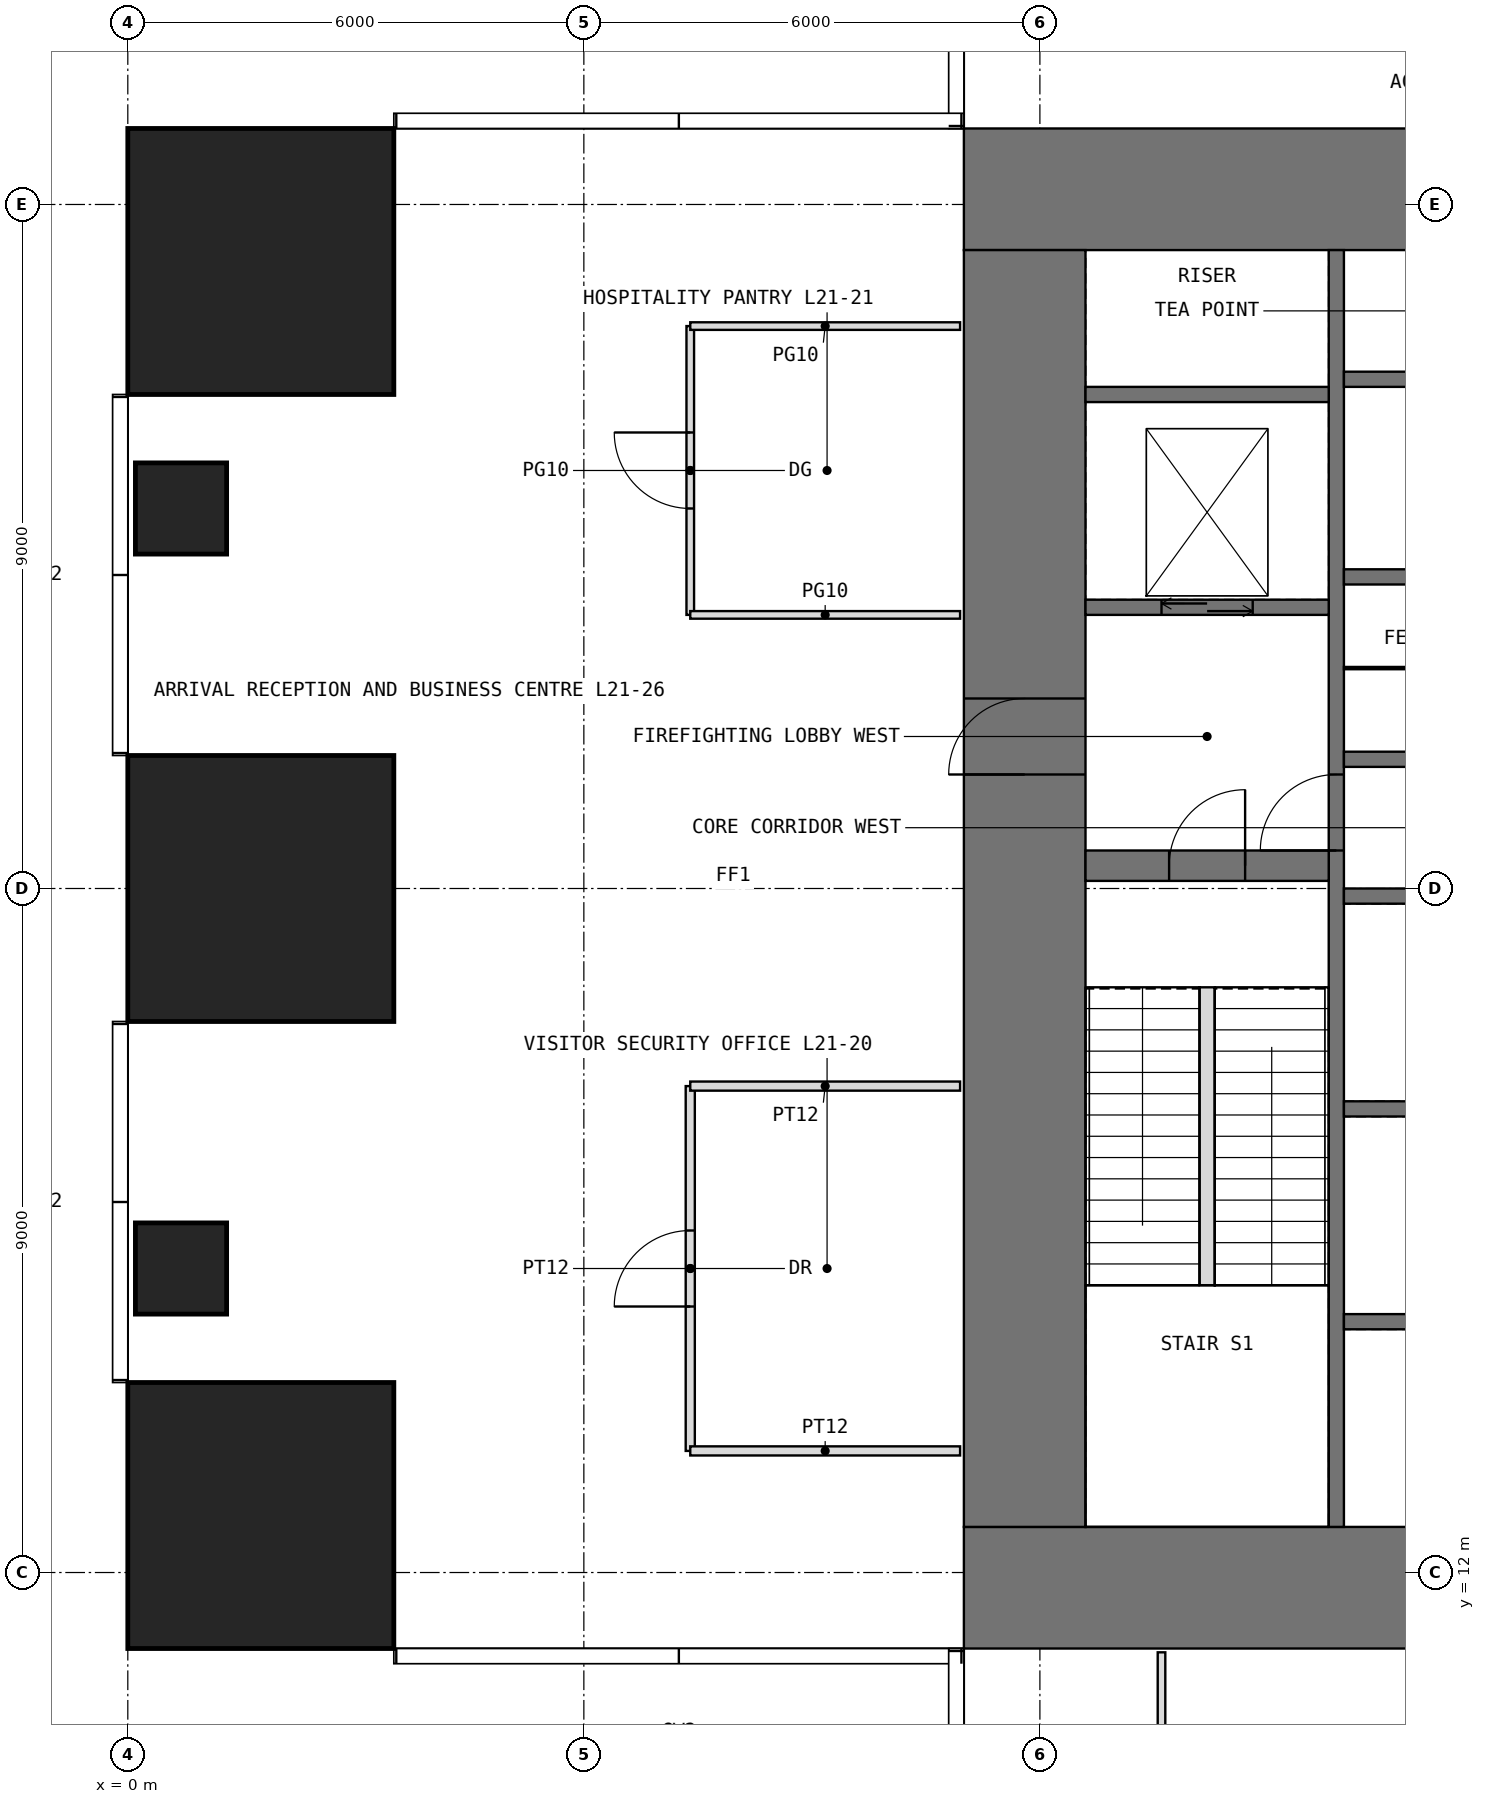
"""IFC4 building model, lengths in metres.
Left out: names, types, materials, properties, quantities, classifications, styles, units other than length and angle.
Written with IfcOpenShell. Run it as: python <this file> out.ifc"""

import sys

from ifc_helpers import new_model, si_unit, direction, frame, frame_2d, origin, origin_2d, place, context, subcontext, project, spatial, rectangle, extrude, element, fill, save


model = new_model("IFC4")
c1 = context("Model", 3, precision=1e-05, world=origin(), true_north=direction((0.0, 1.0)))
c2 = subcontext(c1, "Body", "Model", "MODEL_VIEW")
j1 = project(units=[si_unit("LENGTHUNIT", "METRE"), si_unit("PLANEANGLEUNIT", "RADIAN")], contexts=[c1])
p1 = place(None, origin())
s1 = spatial("IfcSite", under=j1, at=p1, CompositionType="ELEMENT")
p2 = place(p1, origin())
s2 = spatial("IfcBuilding", under=s1, at=p2, CompositionType="ELEMENT")
p3 = place(p2, frame((0.0, 0.0, 91.5)))
s3 = spatial("IfcBuildingStorey", under=s2, at=p3, CompositionType="ELEMENT", Elevation=91.5)
p4 = place(p3, frame((1.75, 12.75, 0.0), z_axis=(0.0, 0.0, 1.0), x_axis=(1.0, 0.0, 0.0)))
e1 = element("IfcColumn", 1, at=p4, inside=s3, PredefinedType="COLUMN", context=c2, shape_type="SweptSolid", body=[
    extrude(rectangle(XDim=3.5, YDim=3.5, at=origin_2d()), origin(), (0.0, 0.0, 1.0), 5.0),
])
p5 = place(p3, frame((0.7, 16.0, 0.0), z_axis=(0.0, 0.0, 1.0), x_axis=(1.0, 0.0, 0.0)))
e2 = element("IfcColumn", 2, at=p5, inside=s3, PredefinedType="COLUMN", context=c2, shape_type="SweptSolid", body=[
    extrude(rectangle(XDim=1.2, YDim=1.2, at=origin_2d()), origin(), (0.0, 0.0, 1.0), 5.0),
])
p6 = place(p3, frame((1.75, 21.0, 0.0), z_axis=(0.0, 0.0, 1.0), x_axis=(1.0, 0.0, 0.0)))
e3 = element("IfcColumn", 3, at=p6, inside=s3, PredefinedType="COLUMN", context=c2, shape_type="SweptSolid", body=[
    extrude(rectangle(XDim=3.5, YDim=3.5, at=origin_2d()), origin(), (0.0, 0.0, 1.0), 5.0),
])
p7 = place(p3, frame((0.7, 26.0, 0.0), z_axis=(0.0, 0.0, 1.0), x_axis=(1.0, 0.0, 0.0)))
e4 = element("IfcColumn", 4, at=p7, inside=s3, PredefinedType="COLUMN", context=c2, shape_type="SweptSolid", body=[
    extrude(rectangle(XDim=1.2, YDim=1.2, at=origin_2d()), origin(), (0.0, 0.0, 1.0), 5.0),
])
p8 = place(p3, frame((1.75, 29.25, 0.0), z_axis=(0.0, 0.0, 1.0), x_axis=(1.0, 0.0, 0.0)))
e5 = element("IfcColumn", 5, at=p8, inside=s3, PredefinedType="COLUMN", context=c2, shape_type="SweptSolid", body=[
    extrude(rectangle(XDim=3.5, YDim=3.5, at=origin_2d()), origin(), (0.0, 0.0, 1.0), 5.0),
])
p9 = place(p3, frame((11.0, 11.8, -0.05), z_axis=(0.0, 0.0, 1.0), x_axis=(1.0, 0.0, 0.0)))
e6 = element("IfcWall", 6, at=p9, inside=s3, PredefinedType="SHEAR", context=c2, shape_type="SweptSolid", body=[
    extrude(rectangle(XDim=20.0, YDim=1.6, at=frame_2d((10.0, 0.0))), origin(), (0.0, 0.0, 1.0), 5.0),
])
p10 = place(p9, frame((9.0, 0.0, 0.05)))
e7 = element("IfcOpeningElement", 7, at=p10, cuts=e6, PredefinedType="OPENING", context=c2, shape_type="SweptSolid", body=[
    extrude(rectangle(XDim=2.0, YDim=2.2, at=frame_2d((1.0, 1.1))), frame((0.0, 0.81, 0.0), z_axis=(0.0, -1.0, 0.0), x_axis=(1.0, 0.0, 0.0)), (0.0, 0.0, 1.0), 1.62),
])
p11 = place(p3, frame((11.0, 30.2, -0.05), z_axis=(0.0, 0.0, 1.0), x_axis=(1.0, 0.0, 0.0)))
e8 = element("IfcWall", 8, at=p11, inside=s3, PredefinedType="SHEAR", context=c2, shape_type="SweptSolid", body=[
    extrude(rectangle(XDim=20.0, YDim=1.6, at=frame_2d((10.0, 0.0))), origin(), (0.0, 0.0, 1.0), 5.0),
])
p12 = place(p11, frame((9.0, 0.0, 0.05)))
e9 = element("IfcOpeningElement", 9, at=p12, cuts=e8, PredefinedType="OPENING", context=c2, shape_type="SweptSolid", body=[
    extrude(rectangle(XDim=2.0, YDim=2.2, at=frame_2d((1.0, 1.1))), frame((0.0, 0.81, 0.0), z_axis=(0.0, -1.0, 0.0), x_axis=(1.0, 0.0, 0.0)), (0.0, 0.0, 1.0), 1.62),
])
p13 = place(p3, frame((11.8, 12.6, -0.05), z_axis=(0.0, 0.0, 1.0), x_axis=(0.0, 1.0, 0.0)))
e10 = element("IfcWall", 10, at=p13, inside=s3, PredefinedType="SHEAR", context=c2, shape_type="SweptSolid", body=[
    extrude(rectangle(XDim=16.8, YDim=1.6, at=frame_2d((8.4, 0.0))), origin(), (0.0, 0.0, 1.0), 5.0),
])
p14 = place(p13, frame((9.9, 0.0, 0.05)))
e11 = element("IfcOpeningElement", 11, at=p14, cuts=e10, PredefinedType="OPENING", context=c2, shape_type="SweptSolid", body=[
    extrude(rectangle(XDim=1.0, YDim=2.2, at=frame_2d((0.5, 1.1))), frame((0.0, 0.81, 0.0), z_axis=(0.0, -1.0, 0.0), x_axis=(1.0, 0.0, 0.0)), (0.0, 0.0, 1.0), 1.62),
])
p15 = place(p3, frame((15.9, 12.6, -0.05), z_axis=(0.0, 0.0, 1.0), x_axis=(0.0, 1.0, 0.0)))
e12 = element("IfcWall", 12, at=p15, inside=s3, PredefinedType="SHEAR", context=c2, shape_type="SweptSolid", body=[
    extrude(rectangle(XDim=16.8, YDim=0.2, at=frame_2d((8.4, 0.0))), origin(), (0.0, 0.0, 1.0), 5.0),
])
p16 = place(p15, frame((8.9, 0.0, 0.05)))
e13 = element("IfcOpeningElement", 13, at=p16, cuts=e12, PredefinedType="OPENING", context=c2, shape_type="SweptSolid", body=[
    extrude(rectangle(XDim=1.0, YDim=2.2, at=frame_2d((0.5, 1.1))), frame((0.0, 0.11, 0.0), z_axis=(0.0, -1.0, 0.0), x_axis=(1.0, 0.0, 0.0)), (0.0, 0.0, 1.0), 0.22),
])
p17 = place(p3, frame((12.6, 21.3, -0.05), z_axis=(0.0, 0.0, 1.0), x_axis=(1.0, 0.0, 0.0)))
e14 = element("IfcWall", 14, at=p17, inside=s3, PredefinedType="SHEAR", context=c2, shape_type="SweptSolid", body=[
    extrude(rectangle(XDim=3.2, YDim=0.4, at=frame_2d((1.6, 0.0))), origin(), (0.0, 0.0, 1.0), 5.0),
])
p18 = place(p17, frame((1.1, 0.0, 0.05)))
e15 = element("IfcOpeningElement", 15, at=p18, cuts=e14, PredefinedType="OPENING", context=c2, shape_type="SweptSolid", body=[
    extrude(rectangle(XDim=1.0, YDim=2.2, at=frame_2d((0.5, 1.1))), frame((0.0, 0.21, 0.0), z_axis=(0.0, -1.0, 0.0), x_axis=(1.0, 0.0, 0.0)), (0.0, 0.0, 1.0), 0.42),
])
p19 = place(p3, frame((12.6, 24.7, -0.05), z_axis=(0.0, 0.0, 1.0), x_axis=(1.0, 0.0, 0.0)))
e16 = element("IfcWall", 16, at=p19, inside=s3, PredefinedType="SHEAR", context=c2, shape_type="SweptSolid", body=[
    extrude(rectangle(XDim=3.2, YDim=0.2, at=frame_2d((1.6, 0.0))), origin(), (0.0, 0.0, 1.0), 5.0),
])
p20 = place(p19, frame((1.0, 0.0, 0.05)))
e17 = element("IfcOpeningElement", 17, at=p20, cuts=e16, PredefinedType="OPENING", context=c2, shape_type="SweptSolid", body=[
    extrude(rectangle(XDim=1.2, YDim=2.2, at=frame_2d((0.6, 1.1))), frame((0.0, 0.11, 0.0), z_axis=(0.0, -1.0, 0.0), x_axis=(1.0, 0.0, 0.0)), (0.0, 0.0, 1.0), 0.22),
])
for number, where, z_axis, x_axis in (
    (18, (12.6, 27.5, -0.05), (0.0, 0.0, 1.0), (1.0, 0.0, 0.0)),
    (19, (16.0, 15.3, -0.05), (0.0, 0.0, 1.0), (1.0, 0.0, 0.0)),
    (20, (16.0, 18.1, -0.05), (0.0, 0.0, 1.0), (1.0, 0.0, 0.0)),
    (21, (16.0, 20.9, -0.05), (0.0, 0.0, 1.0), (1.0, 0.0, 0.0)),
    (22, (16.0, 22.7, -0.05), (0.0, 0.0, 1.0), (1.0, 0.0, 0.0)),
    (23, (16.0, 25.1, -0.05), (0.0, 0.0, 1.0), (1.0, 0.0, 0.0)),
    (24, (16.0, 27.7, -0.05), (0.0, 0.0, 1.0), (1.0, 0.0, 0.0)),
):
    element("IfcWall", number, at=place(p3, frame(where, z_axis=z_axis, x_axis=x_axis)), inside=s3, PredefinedType="SHEAR", context=c2, shape_type="SweptSolid", body=[
        extrude(rectangle(XDim=3.2, YDim=0.2, at=frame_2d((1.6, 0.0))), origin(), (0.0, 0.0, 1.0), 5.0),
    ])
p21 = place(p3, frame((16.0, 23.9, 0.0), z_axis=(0.0, 0.0, 1.0), x_axis=(1.0, 0.0, 0.0)))
e25 = element("IfcWall", 25, at=p21, inside=s3, PredefinedType="PARTITIONING", context=c2, shape_type="SweptSolid", body=[
    extrude(rectangle(XDim=1.4, YDim=0.03, at=frame_2d((0.7, 0.0))), origin(), (0.0, 0.0, 1.0), 4.75),
])
p22 = place(p3, frame((7.4, 13.6, 0.0), z_axis=(0.0, 0.0, 1.0), x_axis=(0.0, 1.0, 0.0)))
e26 = element("IfcWall", 26, at=p22, inside=s3, PredefinedType="PARTITIONING", context=c2, shape_type="SweptSolid", body=[
    extrude(rectangle(XDim=4.8, YDim=0.12, at=frame_2d((2.4, 0.0))), origin(), (0.0, 0.0, 1.0), 4.75),
])
p23 = place(p22, frame((1.9, 0.0, 0.0)))
e27 = element("IfcOpeningElement", 27, at=p23, cuts=e26, PredefinedType="OPENING", context=c2, shape_type="SweptSolid", body=[
    extrude(rectangle(XDim=1.0, YDim=2.2, at=frame_2d((0.5, 1.1))), frame((0.0, 0.07, 0.0), z_axis=(0.0, -1.0, 0.0), x_axis=(1.0, 0.0, 0.0)), (0.0, 0.0, 1.0), 0.14),
])
for number, where, z_axis, x_axis in (
    (28, (7.4, 13.6, 0.0), (0.0, 0.0, 1.0), (1.0, 0.0, 0.0)),
    (29, (7.4, 18.4, 0.0), (0.0, 0.0, 1.0), (1.0, 0.0, 0.0)),
):
    element("IfcWall", number, at=place(p3, frame(where, z_axis=z_axis, x_axis=x_axis)), inside=s3, PredefinedType="PARTITIONING", context=c2, shape_type="SweptSolid", body=[
        extrude(rectangle(XDim=3.55, YDim=0.12, at=frame_2d((1.775, 0.0))), origin(), (0.0, 0.0, 1.0), 4.75),
    ])
p24 = place(p3, frame((7.4, 24.6, 0.0), z_axis=(0.0, 0.0, 1.0), x_axis=(0.0, 1.0, 0.0)))
e30 = element("IfcWall", 30, at=p24, inside=s3, PredefinedType="PARTITIONING", context=c2, shape_type="SweptSolid", body=[
    extrude(rectangle(XDim=3.8, YDim=0.1, at=frame_2d((1.9, 0.0))), origin(), (0.0, 0.0, 1.0), 4.75),
])
p25 = place(p24, frame((1.4, 0.0, 0.0)))
e31 = element("IfcOpeningElement", 31, at=p25, cuts=e30, PredefinedType="OPENING", context=c2, shape_type="SweptSolid", body=[
    extrude(rectangle(XDim=1.0, YDim=2.4, at=frame_2d((0.5, 1.2))), frame((0.0, 0.06, 0.0), z_axis=(0.0, -1.0, 0.0), x_axis=(1.0, 0.0, 0.0)), (0.0, 0.0, 1.0), 0.12),
])
for number, where, z_axis, x_axis in (
    (32, (7.4, 24.6, 0.0), (0.0, 0.0, 1.0), (1.0, 0.0, 0.0)),
    (33, (7.4, 28.4, 0.0), (0.0, 0.0, 1.0), (1.0, 0.0, 0.0)),
):
    element("IfcWall", number, at=place(p3, frame(where, z_axis=z_axis, x_axis=x_axis)), inside=s3, PredefinedType="PARTITIONING", context=c2, shape_type="SweptSolid", body=[
        extrude(rectangle(XDim=3.55, YDim=0.1, at=frame_2d((1.775, 0.0))), origin(), (0.0, 0.0, 1.0), 4.75),
    ])
p26 = place(p3, frame((13.6, 7.0, 0.0), z_axis=(0.0, 0.0, 1.0), x_axis=(0.0, 1.0, 0.0)))
e34 = element("IfcWall", 34, at=p26, inside=s3, PredefinedType="PARTITIONING", context=c2, shape_type="SweptSolid", body=[
    extrude(rectangle(XDim=3.95, YDim=0.1, at=frame_2d((1.975, 0.0))), origin(), (0.0, 0.0, 1.0), 4.75),
])
p27 = place(p3, frame((14.2, 15.78, 0.0), z_axis=(0.0, 0.0, 1.0), x_axis=(0.0, 1.0, 0.0)))
e35 = element("IfcWall", 35, at=p27, inside=s3, PredefinedType="PARTITIONING", context=c2, shape_type="SweptSolid", body=[
    extrude(rectangle(XDim=3.92, YDim=0.2, at=frame_2d((1.96, 0.0))), origin(), (0.0, 0.0, 1.0), 5.0),
])
p28 = place(p14, origin())
e36 = element("IfcDoor", 36, at=p28, inside=s3, OperationType="SINGLE_SWING_LEFT", PredefinedType="DOOR", context=c2, shape_type="SweptSolid", body=[
    extrude(rectangle(XDim=1.0, YDim=2.2, at=frame_2d((0.5, 1.1))), frame((0.0, 0.025, 0.0), z_axis=(0.0, -1.0, 0.0), x_axis=(1.0, 0.0, 0.0)), (0.0, 0.0, 1.0), 0.05),
])
fill(e11, e36)
p29 = place(p18, origin())
e37 = element("IfcDoor", 37, at=p29, inside=s3, OperationType="SINGLE_SWING_RIGHT", PredefinedType="DOOR", context=c2, shape_type="SweptSolid", body=[
    extrude(rectangle(XDim=1.0, YDim=2.2, at=frame_2d((0.5, 1.1))), frame((0.0, 0.025, 0.0), z_axis=(0.0, -1.0, 0.0), x_axis=(1.0, 0.0, 0.0)), (0.0, 0.0, 1.0), 0.05),
])
fill(e15, e37)
p30 = place(p16, origin())
e38 = element("IfcDoor", 38, at=p30, inside=s3, OperationType="SINGLE_SWING_LEFT", PredefinedType="DOOR", context=c2, shape_type="SweptSolid", body=[
    extrude(rectangle(XDim=1.0, YDim=2.2, at=frame_2d((0.5, 1.1))), frame((0.0, 0.025, 0.0), z_axis=(0.0, -1.0, 0.0), x_axis=(1.0, 0.0, 0.0)), (0.0, 0.0, 1.0), 0.05),
])
fill(e13, e38)
p31 = place(p23, origin())
e39 = element("IfcDoor", 39, at=p31, inside=s3, OperationType="SINGLE_SWING_LEFT", PredefinedType="DOOR", context=c2, shape_type="SweptSolid", body=[
    extrude(rectangle(XDim=1.0, YDim=2.2, at=frame_2d((0.5, 1.1))), frame((0.0, 0.025, 0.0), z_axis=(0.0, -1.0, 0.0), x_axis=(1.0, 0.0, 0.0)), (0.0, 0.0, 1.0), 0.05),
])
fill(e27, e39)
p32 = place(p25, origin())
e40 = element("IfcDoor", 40, at=p32, inside=s3, OperationType="SINGLE_SWING_RIGHT", PredefinedType="DOOR", context=c2, shape_type="SweptSolid", body=[
    extrude(rectangle(XDim=1.0, YDim=2.4, at=frame_2d((0.5, 1.2))), frame((0.0, 0.025, 0.0), z_axis=(0.0, -1.0, 0.0), x_axis=(1.0, 0.0, 0.0)), (0.0, 0.0, 1.0), 0.05),
])
fill(e31, e40)
p33 = place(p20, origin())
e41 = element("IfcDoor", 41, at=p33, inside=s3, OperationType="DOUBLE_DOOR_SLIDING", PredefinedType="DOOR", context=c2, shape_type="SweptSolid", body=[
    extrude(rectangle(XDim=1.2, YDim=2.2, at=frame_2d((0.6, 1.1))), frame((0.0, 0.025, 0.0), z_axis=(0.0, -1.0, 0.0), x_axis=(1.0, 0.0, 0.0)), (0.0, 0.0, 1.0), 0.05),
])
fill(e17, e41)
save(model, sys.argv[1])
